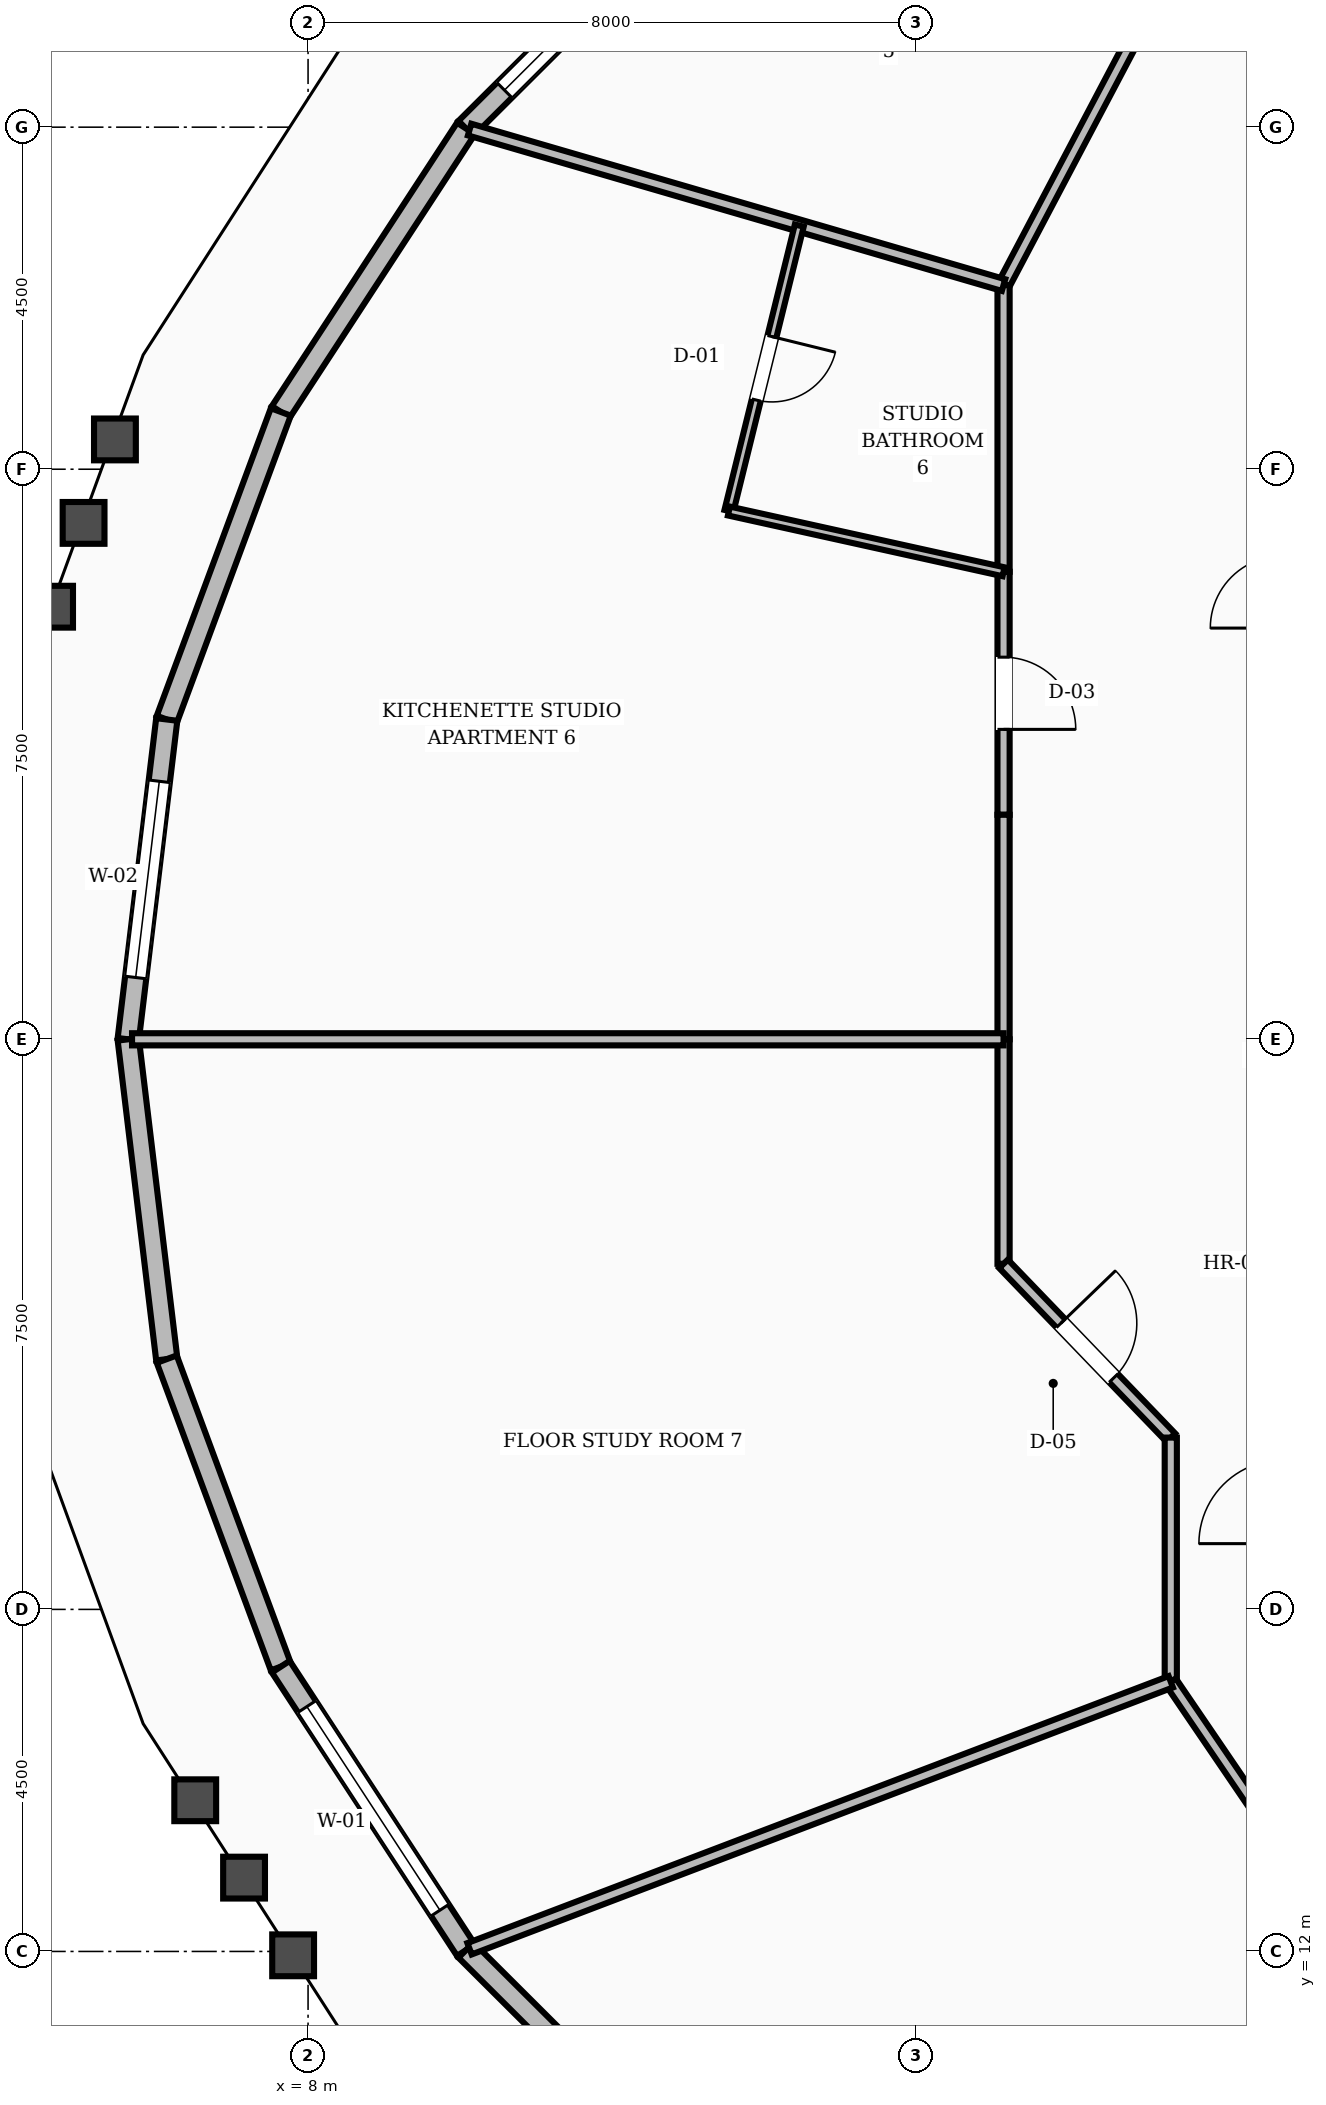
"""IFC4 building model, lengths in metres.
Left out: names, types, materials, properties, quantities, classifications, styles, units other than length and angle.
Written with IfcOpenShell. Run it as: python <this file> out.ifc"""

import sys

from ifc_helpers import new_model, si_unit, direction, frame, frame_2d, origin, place, context, subcontext, project, spatial, rectangle, extrude, element, fill, save


model = new_model("IFC4")
c1 = context("Model", 3, precision=1e-05, world=origin(), true_north=direction((0.0, 1.0)))
c2 = subcontext(c1, "Body", "Model", "MODEL_VIEW")
j1 = project(units=[si_unit("LENGTHUNIT", "METRE"), si_unit("PLANEANGLEUNIT", "RADIAN")], contexts=[c1])
p1 = place(None, origin())
s1 = spatial("IfcSite", under=j1, at=p1, CompositionType="ELEMENT")
p2 = place(p1, origin())
s2 = spatial("IfcBuilding", under=s1, at=p2, CompositionType="ELEMENT")
p3 = place(p2, frame((0.0, 0.0, 149.6)))
s3 = spatial("IfcBuildingStorey", under=s2, at=p3, CompositionType="ELEMENT", Elevation=149.6)
p4 = place(p3, frame((13.357, 39.251, 0.0), z_axis=(0.0, 0.0, 1.0), x_axis=(-0.708239604084, -0.705972140532, 0.0)))
e1 = element("IfcWall", 1, at=p4, inside=s3, PredefinedType="STANDARD", context=c2, shape_type="SweptSolid", body=[
    extrude(rectangle(XDim=4.63, YDim=0.28, at=frame_2d((2.315, 0.0))), origin(), (0.0, 0.0, 1.0), 2.82),
])
p5 = place(p4, frame((0.715, 0.0, 0.8)))
e2 = element("IfcOpeningElement", 2, at=p5, cuts=e1, PredefinedType="OPENING", context=c2, shape_type="SweptSolid", body=[
    extrude(rectangle(XDim=3.2, YDim=1.65, at=frame_2d((1.6, 0.825))), frame((0.0, 0.15, 0.0), z_axis=(0.0, -1.0, 0.0), x_axis=(1.0, 0.0, 0.0)), (0.0, 0.0, 1.0), 0.3),
])
p6 = place(p3, frame((10.078, 35.982, 0.0), z_axis=(0.0, 0.0, 1.0), x_axis=(-0.547011581396, -0.837125038342, 0.0)))
e3 = element("IfcWall", 3, at=p6, inside=s3, PredefinedType="STANDARD", context=c2, shape_type="SweptSolid", body=[
    extrude(rectangle(XDim=4.454, YDim=0.28, at=frame_2d((2.227, 0.0))), origin(), (0.0, 0.0, 1.0), 2.82),
])
p7 = place(p3, frame((7.641, 32.254, 0.0), z_axis=(0.0, 0.0, 1.0), x_axis=(-0.347673660549, -0.937615606611, 0.0)))
e4 = element("IfcWall", 4, at=p7, inside=s3, PredefinedType="STANDARD", context=c2, shape_type="SweptSolid", body=[
    extrude(rectangle(XDim=4.315, YDim=0.28, at=frame_2d((2.158, 0.0))), origin(), (0.0, 0.0, 1.0), 2.82),
])
p8 = place(p3, frame((6.141, 28.208, 0.0), z_axis=(0.0, 0.0, 1.0), x_axis=(-0.119531368207, -0.992830424602, 0.0)))
e5 = element("IfcWall", 5, at=p8, inside=s3, PredefinedType="STANDARD", context=c2, shape_type="SweptSolid", body=[
    extrude(rectangle(XDim=4.238, YDim=0.28, at=frame_2d((2.119, 0.0))), origin(), (0.0, 0.0, 1.0), 2.82),
])
p9 = place(p8, frame((0.819, 0.0, 0.8)))
e6 = element("IfcOpeningElement", 6, at=p9, cuts=e5, PredefinedType="OPENING", context=c2, shape_type="SweptSolid", body=[
    extrude(rectangle(XDim=2.6, YDim=1.65, at=frame_2d((1.3, 0.825))), frame((0.0, 0.15, 0.0), z_axis=(0.0, -1.0, 0.0), x_axis=(1.0, 0.0, 0.0)), (0.0, 0.0, 1.0), 0.3),
])
p10 = place(p3, frame((5.634, 24.0, 0.0), z_axis=(0.0, 0.0, 1.0), x_axis=(0.119531368207, -0.992830424602, 0.0)))
e7 = element("IfcWall", 7, at=p10, inside=s3, PredefinedType="STANDARD", context=c2, shape_type="SweptSolid", body=[
    extrude(rectangle(XDim=4.238, YDim=0.28, at=frame_2d((2.119, 0.0))), origin(), (0.0, 0.0, 1.0), 2.82),
])
p11 = place(p3, frame((6.141, 19.792, 0.0), z_axis=(0.0, 0.0, 1.0), x_axis=(0.347673660549, -0.937615606611, 0.0)))
e8 = element("IfcWall", 8, at=p11, inside=s3, PredefinedType="STANDARD", context=c2, shape_type="SweptSolid", body=[
    extrude(rectangle(XDim=4.315, YDim=0.28, at=frame_2d((2.158, 0.0))), origin(), (0.0, 0.0, 1.0), 2.82),
])
p12 = place(p3, frame((7.641, 15.746, 0.0), z_axis=(0.0, 0.0, 1.0), x_axis=(0.547011581396, -0.837125038342, 0.0)))
e9 = element("IfcWall", 9, at=p12, inside=s3, PredefinedType="STANDARD", context=c2, shape_type="SweptSolid", body=[
    extrude(rectangle(XDim=4.454, YDim=0.28, at=frame_2d((2.227, 0.0))), origin(), (0.0, 0.0, 1.0), 2.82),
])
p13 = place(p12, frame((0.627, 0.0, 0.8)))
e10 = element("IfcOpeningElement", 10, at=p13, cuts=e9, PredefinedType="OPENING", context=c2, shape_type="SweptSolid", body=[
    extrude(rectangle(XDim=3.2, YDim=1.65, at=frame_2d((1.6, 0.825))), frame((0.0, 0.15, 0.0), z_axis=(0.0, -1.0, 0.0), x_axis=(1.0, 0.0, 0.0)), (0.0, 0.0, 1.0), 0.3),
])
p14 = place(p3, frame((10.078, 12.018, 0.0), z_axis=(0.0, 0.0, 1.0), x_axis=(0.708239604084, -0.705972140532, 0.0)))
e11 = element("IfcWall", 11, at=p14, inside=s3, PredefinedType="STANDARD", context=c2, shape_type="SweptSolid", body=[
    extrude(rectangle(XDim=4.63, YDim=0.28, at=frame_2d((2.315, 0.0))), origin(), (0.0, 0.0, 1.0), 2.82),
])
p15 = place(p3, frame((18.85, 37.15, 0.0), z_axis=(0.0, 0.0, 1.0), x_axis=(-0.466093963429, -0.884735224378, 0.0)))
e12 = element("IfcWall", 12, at=p15, inside=s3, PredefinedType="SOLIDWALL", context=c2, shape_type="SweptSolid", body=[
    extrude(rectangle(XDim=3.648, YDim=0.16, at=frame_2d((1.824, 0.0))), origin(), (0.0, 0.0, 1.0), 2.8),
])
p16 = place(p3, frame((17.15, 33.923, 0.0), z_axis=(0.0, 0.0, 1.0), x_axis=(0.0, -1.0, 0.0)))
e13 = element("IfcWall", 13, at=p16, inside=s3, PredefinedType="SOLIDWALL", context=c2, shape_type="SweptSolid", body=[
    extrude(rectangle(XDim=3.771, YDim=0.16, at=frame_2d((1.886, 0.0))), origin(), (0.0, 0.0, 1.0), 2.8),
])
p17 = place(p3, frame((17.15, 30.151, 0.0), z_axis=(0.0, 0.0, 1.0), x_axis=(0.0, -1.0, 0.0)))
e14 = element("IfcWall", 14, at=p17, inside=s3, PredefinedType="SOLIDWALL", context=c2, shape_type="SweptSolid", body=[
    extrude(rectangle(XDim=3.197, YDim=0.16, at=frame_2d((1.599, 0.0))), origin(), (0.0, 0.0, 1.0), 2.8),
])
p18 = place(p17, frame((1.124, 0.0, 0.0)))
e15 = element("IfcOpeningElement", 15, at=p18, cuts=e14, PredefinedType="OPENING", context=c2, shape_type="SweptSolid", body=[
    extrude(rectangle(XDim=0.95, YDim=2.1, at=frame_2d((0.475, 1.05))), frame((0.0, 0.09, 0.0), z_axis=(0.0, -1.0, 0.0), x_axis=(1.0, 0.0, 0.0)), (0.0, 0.0, 1.0), 0.18),
])
for number, where, z_axis, x_axis in (
    (16, (17.15, 26.954, 0.0), (0.0, 0.0, 1.0), (0.0, -1.0, 0.0)),
    (17, (17.15, 24.0, 0.0), (0.0, 0.0, 1.0), (0.0, -1.0, 0.0)),
):
    element("IfcWall", number, at=place(p3, frame(where, z_axis=z_axis, x_axis=x_axis)), inside=s3, PredefinedType="SOLIDWALL", context=c2, shape_type="SweptSolid", body=[
        extrude(rectangle(XDim=2.954, YDim=0.16, at=frame_2d((1.477, 0.0))), origin(), (0.0, 0.0, 1.0), 2.8),
    ])
p19 = place(p3, frame((17.15, 21.046, 0.0), z_axis=(0.0, 0.0, 1.0), x_axis=(0.693473090138, -0.72048252807, 0.0)))
e18 = element("IfcWall", 18, at=p19, inside=s3, PredefinedType="SOLIDWALL", context=c2, shape_type="SweptSolid", body=[
    extrude(rectangle(XDim=3.173, YDim=0.16, at=frame_2d((1.586, 0.0))), origin(), (0.0, 0.0, 1.0), 2.8),
])
p20 = place(p19, frame((1.086, 0.0, 0.0)))
e19 = element("IfcOpeningElement", 19, at=p20, cuts=e18, PredefinedType="OPENING", context=c2, shape_type="SweptSolid", body=[
    extrude(rectangle(XDim=1.0, YDim=2.1, at=frame_2d((0.5, 1.05))), frame((0.0, 0.09, 0.0), z_axis=(0.0, -1.0, 0.0), x_axis=(1.0, 0.0, 0.0)), (0.0, 0.0, 1.0), 0.18),
])
p21 = place(p3, frame((19.35, 18.76, 0.0), z_axis=(0.0, 0.0, 1.0), x_axis=(0.0, -1.0, 0.0)))
e20 = element("IfcWall", 20, at=p21, inside=s3, PredefinedType="SOLIDWALL", context=c2, shape_type="SweptSolid", body=[
    extrude(rectangle(XDim=3.213, YDim=0.16, at=frame_2d((1.606, 0.0))), origin(), (0.0, 0.0, 1.0), 2.8),
])
p22 = place(p3, frame((19.35, 15.548, 0.0), z_axis=(0.0, 0.0, 1.0), x_axis=(0.562674669208, -0.826678423955, 0.0)))
e21 = element("IfcWall", 21, at=p22, inside=s3, PredefinedType="SOLIDWALL", context=c2, shape_type="SweptSolid", body=[
    extrude(rectangle(XDim=3.021, YDim=0.16, at=frame_2d((1.511, 0.0))), origin(), (0.0, 0.0, 1.0), 2.8),
])
p23 = place(p3, frame((17.15, 33.923, 0.0), z_axis=(0.0, 0.0, 1.0), x_axis=(-0.960106072599, 0.279636065911, 0.0)))
e22 = element("IfcWall", 22, at=p23, inside=s3, PredefinedType="SOLIDWALL", context=c2, shape_type="SweptSolid", body=[
    extrude(rectangle(XDim=7.316, YDim=0.16, at=frame_2d((3.658, 0.0))), origin(), (0.0, 0.0, 1.0), 2.8),
])
p24 = place(p3, frame((14.462, 34.705, 0.0), z_axis=(0.0, 0.0, 1.0), x_axis=(-0.239370650349, -0.970928262927, 0.0)))
e23 = element("IfcWall", 23, at=p24, inside=s3, PredefinedType="PARTITIONING", context=c2, shape_type="SweptSolid", body=[
    extrude(rectangle(XDim=3.868, YDim=0.12, at=frame_2d((1.934, 0.0))), origin(), (0.0, 0.0, 1.0), 2.8),
])
p25 = place(p24, frame((1.504, 0.0, 0.0)))
e24 = element("IfcOpeningElement", 24, at=p25, cuts=e23, PredefinedType="OPENING", context=c2, shape_type="SweptSolid", body=[
    extrude(rectangle(XDim=0.86, YDim=2.1, at=frame_2d((0.43, 1.05))), frame((0.0, 0.07, 0.0), z_axis=(0.0, -1.0, 0.0), x_axis=(1.0, 0.0, 0.0)), (0.0, 0.0, 1.0), 0.14),
])
p26 = place(p3, frame((17.15, 30.151, 0.0), z_axis=(0.0, 0.0, 1.0), x_axis=(-0.976408530685, 0.21593142709, 0.0)))
e25 = element("IfcWall", 25, at=p26, inside=s3, PredefinedType="PARTITIONING", context=c2, shape_type="SweptSolid", body=[
    extrude(rectangle(XDim=3.701, YDim=0.12, at=frame_2d((1.85, 0.0))), origin(), (0.0, 0.0, 1.0), 2.8),
])
p27 = place(p3, frame((17.15, 24.0, 0.0), z_axis=(0.0, 0.0, 1.0), x_axis=(-1.0, 0.0, 0.0)))
e26 = element("IfcWall", 26, at=p27, inside=s3, PredefinedType="SOLIDWALL", context=c2, shape_type="SweptSolid", body=[
    extrude(rectangle(XDim=11.466, YDim=0.16, at=frame_2d((5.733, 0.0))), origin(), (0.0, 0.0, 1.0), 2.8),
])
p28 = place(p3, frame((19.35, 15.548, 0.0), z_axis=(0.0, 0.0, 1.0), x_axis=(-0.934568417975, -0.355783462409, 0.0)))
e27 = element("IfcWall", 27, at=p28, inside=s3, PredefinedType="SOLIDWALL", context=c2, shape_type="SweptSolid", body=[
    extrude(rectangle(XDim=9.872, YDim=0.16, at=frame_2d((4.936, 0.0))), origin(), (0.0, 0.0, 1.0), 2.8),
])
p29 = place(p5, origin())
e28 = element("IfcWindow", 28, at=p29, inside=s3, PartitioningType="SINGLE_PANEL", PredefinedType="WINDOW", context=c2, shape_type="SweptSolid", body=[
    extrude(rectangle(XDim=3.2, YDim=1.65, at=frame_2d((1.6, 0.825))), frame((0.0, 0.03, 0.0), z_axis=(0.0, -1.0, 0.0), x_axis=(1.0, 0.0, 0.0)), (0.0, 0.0, 1.0), 0.06),
])
fill(e2, e28)
p30 = place(p9, origin())
e29 = element("IfcWindow", 29, at=p30, inside=s3, PartitioningType="SINGLE_PANEL", PredefinedType="WINDOW", context=c2, shape_type="SweptSolid", body=[
    extrude(rectangle(XDim=2.6, YDim=1.65, at=frame_2d((1.3, 0.825))), frame((0.0, 0.03, 0.0), z_axis=(0.0, -1.0, 0.0), x_axis=(1.0, 0.0, 0.0)), (0.0, 0.0, 1.0), 0.06),
])
fill(e6, e29)
p31 = place(p13, origin())
e30 = element("IfcWindow", 30, at=p31, inside=s3, PartitioningType="SINGLE_PANEL", PredefinedType="WINDOW", context=c2, shape_type="SweptSolid", body=[
    extrude(rectangle(XDim=3.2, YDim=1.65, at=frame_2d((1.6, 0.825))), frame((0.0, 0.03, 0.0), z_axis=(0.0, -1.0, 0.0), x_axis=(1.0, 0.0, 0.0)), (0.0, 0.0, 1.0), 0.06),
])
fill(e10, e30)
p32 = place(p25, origin())
e31 = element("IfcDoor", 31, at=p32, inside=s3, OperationType="SINGLE_SWING_LEFT", PredefinedType="DOOR", context=c2, shape_type="SweptSolid", body=[
    extrude(rectangle(XDim=0.86, YDim=2.1, at=frame_2d((0.43, 1.05))), frame((0.0, 0.025, 0.0), z_axis=(0.0, -1.0, 0.0), x_axis=(1.0, 0.0, 0.0)), (0.0, 0.0, 1.0), 0.05),
])
fill(e24, e31)
p33 = place(p18, origin())
e32 = element("IfcDoor", 32, at=p33, inside=s3, OperationType="SINGLE_SWING_RIGHT", PredefinedType="DOOR", context=c2, shape_type="SweptSolid", body=[
    extrude(rectangle(XDim=0.95, YDim=2.1, at=frame_2d((0.475, 1.05))), frame((0.0, 0.025, 0.0), z_axis=(0.0, -1.0, 0.0), x_axis=(1.0, 0.0, 0.0)), (0.0, 0.0, 1.0), 0.05),
])
fill(e15, e32)
p34 = place(p20, origin())
e33 = element("IfcDoor", 33, at=p34, inside=s3, OperationType="SINGLE_SWING_LEFT", PredefinedType="DOOR", context=c2, shape_type="SweptSolid", body=[
    extrude(rectangle(XDim=1.0, YDim=2.1, at=frame_2d((0.5, 1.05))), frame((0.0, 0.025, 0.0), z_axis=(0.0, -1.0, 0.0), x_axis=(1.0, 0.0, 0.0)), (0.0, 0.0, 1.0), 0.05),
])
fill(e19, e33)
save(model, sys.argv[1])
